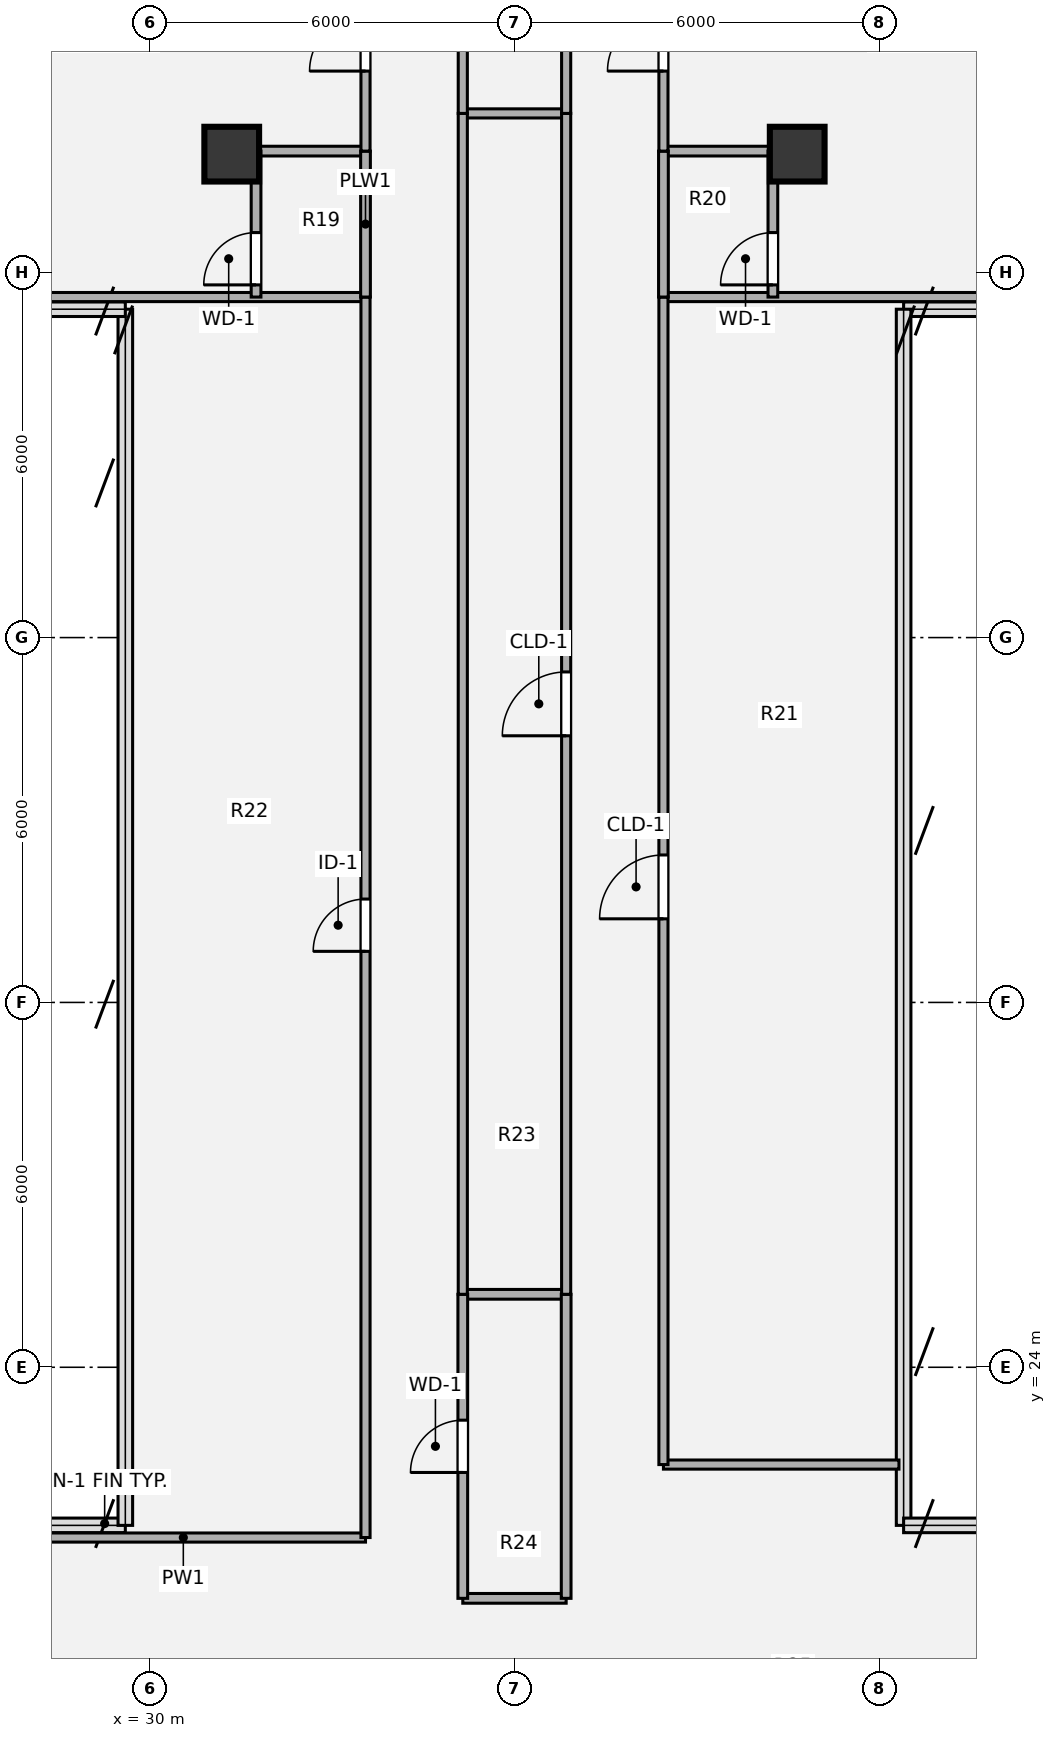
"""IFC4 building model, lengths in metres.
Left out: names, types, materials, properties, quantities, classifications, styles, units other than length and angle.
Written with IfcOpenShell. Run it as: python <this file> out.ifc"""

import sys

from ifc_helpers import new_model, si_unit, direction, frame, frame_2d, origin, origin_2d, place, context, subcontext, project, spatial, rectangle, hollow_circle, extrude, source, transform, mapped, element, fill, save


model = new_model("IFC4")
c1 = context("Model", 3, precision=1e-05, world=origin(), true_north=direction((0.0, 1.0)))
c2 = subcontext(c1, "Body", "Model", "MODEL_VIEW")
j1 = project(units=[si_unit("LENGTHUNIT", "METRE"), si_unit("PLANEANGLEUNIT", "RADIAN")], contexts=[c1])
p1 = place(None, origin())
s1 = spatial("IfcSite", under=j1, at=p1, CompositionType="ELEMENT")
p2 = place(p1, origin())
s2 = spatial("IfcBuilding", under=s1, at=p2, CompositionType="ELEMENT")
p3 = place(p2, frame((0.0, 0.0, 226.8)))
s3 = spatial("IfcBuildingStorey", under=s2, at=p3, CompositionType="ELEMENT", Elevation=226.8)
m1 = source(origin(), c2, "Body", "SweptSolid", [
    extrude(hollow_circle(Radius=0.45, WallThickness=0.032, at=origin_2d()), origin(), (0.0, 0.0, 1.0), 3.78),
])
for number, where, z_axis, x_axis in (
    (1, (31.35, 43.95, 0.0), (0.0, 0.0, 1.0), (1.0, 0.0, 0.0)),
    (2, (40.65, 43.95, 0.0), (0.0, 0.0, 1.0), (1.0, 0.0, 0.0)),
):
    element("IfcColumn", number, at=place(p3, frame(where, z_axis=z_axis, x_axis=x_axis)), inside=s3, PredefinedType="COLUMN", context=c2, shape_type="MappedRepresentation", body=[
        mapped(m1, transform((0.0, 0.0, 0.0), x_axis=(1.0, 0.0, 0.0), y_axis=(0.0, 1.0, 0.0), z_axis=(0.0, 0.0, 1.0), scale=1.0)),
    ])
p4 = place(p3, frame((35.15, 20.2, 0.0), z_axis=(0.0, 0.0, 1.0), x_axis=(1.0, 0.0, 0.0)))
e3 = element("IfcWall", 3, at=p4, inside=s3, PredefinedType="PLUMBINGWALL", context=c2, shape_type="SweptSolid", body=[
    extrude(rectangle(XDim=1.7, YDim=0.16, at=frame_2d((0.85, 0.0))), origin(), (0.0, 0.0, 1.0), 3.5),
])
p5 = place(p3, frame((27.558, 21.2, 0.0), z_axis=(0.0, 0.0, 1.0), x_axis=(1.0, 0.0, 0.0)))
e4 = element("IfcWall", 4, at=p5, inside=s3, PredefinedType="PARTITIONING", context=c2, shape_type="SweptSolid", body=[
    extrude(rectangle(XDim=5.992, YDim=0.15, at=frame_2d((2.996, 0.0))), origin(), (0.0, 0.0, 1.0), 3.5),
])
p6 = place(p3, frame((38.45, 22.4, 0.0), z_axis=(0.0, 0.0, 1.0), x_axis=(1.0, 0.0, 0.0)))
e5 = element("IfcWall", 5, at=p6, inside=s3, PredefinedType="PARTITIONING", context=c2, shape_type="SweptSolid", body=[
    extrude(rectangle(XDim=3.873, YDim=0.15, at=frame_2d((1.937, 0.0))), origin(), (0.0, 0.0, 1.0), 3.5),
])
p7 = place(p3, frame((35.15, 25.2, 0.0), z_axis=(0.0, 0.0, 1.0), x_axis=(1.0, 0.0, 0.0)))
e6 = element("IfcWall", 6, at=p7, inside=s3, PredefinedType="PLUMBINGWALL", context=c2, shape_type="SweptSolid", body=[
    extrude(rectangle(XDim=1.7, YDim=0.16, at=frame_2d((0.85, 0.0))), origin(), (0.0, 0.0, 1.0), 3.5),
])
p8 = place(p3, frame((27.558, 41.6, 0.0), z_axis=(0.0, 0.0, 1.0), x_axis=(1.0, 0.0, 0.0)))
e7 = element("IfcWall", 7, at=p8, inside=s3, PredefinedType="PARTITIONING", context=c2, shape_type="SweptSolid", body=[
    extrude(rectangle(XDim=5.992, YDim=0.15, at=frame_2d((2.996, 0.0))), origin(), (0.0, 0.0, 1.0), 3.5),
])
p9 = place(p3, frame((38.45, 41.6, 0.0), z_axis=(0.0, 0.0, 1.0), x_axis=(1.0, 0.0, 0.0)))
e8 = element("IfcWall", 8, at=p9, inside=s3, PredefinedType="PARTITIONING", context=c2, shape_type="SweptSolid", body=[
    extrude(rectangle(XDim=5.993, YDim=0.15, at=frame_2d((2.997, 0.0))), origin(), (0.0, 0.0, 1.0), 3.5),
])
for number, where, z_axis, x_axis in (
    (9, (31.75, 44.0, 0.0), (0.0, 0.0, 1.0), (1.0, 0.0, 0.0)),
    (10, (38.45, 44.0, 0.0), (0.0, 0.0, 1.0), (1.0, 0.0, 0.0)),
):
    element("IfcWall", number, at=place(p3, frame(where, z_axis=z_axis, x_axis=x_axis)), inside=s3, PredefinedType="PLUMBINGWALL", context=c2, shape_type="SweptSolid", body=[
        extrude(rectangle(XDim=1.8, YDim=0.16, at=frame_2d((0.9, 0.0))), origin(), (0.0, 0.0, 1.0), 2.903),
    ])
p10 = place(p3, frame((35.15, 44.62, 0.0), z_axis=(0.0, 0.0, 1.0), x_axis=(1.0, 0.0, 0.0)))
e11 = element("IfcWall", 11, at=p10, inside=s3, PredefinedType="PARTITIONING", context=c2, shape_type="SweptSolid", body=[
    extrude(rectangle(XDim=1.7, YDim=0.15, at=frame_2d((0.85, 0.0))), origin(), (0.0, 0.0, 1.0), 3.259),
])
p11 = place(p3, frame((31.75, 41.6, 0.0), z_axis=(0.0, 0.0, 1.0), x_axis=(0.0, 1.0, 0.0)))
e12 = element("IfcWall", 12, at=p11, inside=s3, PredefinedType="PLUMBINGWALL", context=c2, shape_type="SweptSolid", body=[
    extrude(rectangle(XDim=2.4, YDim=0.16, at=frame_2d((1.2, 0.0))), origin(), (0.0, 0.0, 1.0), 3.5),
])
p12 = place(p11, frame((0.2, 0.0, 0.0)))
e13 = element("IfcOpeningElement", 13, at=p12, cuts=e12, PredefinedType="OPENING", context=c2, shape_type="SweptSolid", body=[
    extrude(rectangle(XDim=0.86, YDim=2.1, at=origin_2d()), frame((0.43, 0.09, 1.05), z_axis=(0.0, -1.0, 0.0), x_axis=(1.0, 0.0, 0.0)), (0.0, 0.0, 1.0), 0.18),
])
p13 = place(p3, frame((33.55, 21.2, 0.0), z_axis=(0.0, 0.0, 1.0), x_axis=(0.0, 1.0, 0.0)))
e14 = element("IfcWall", 14, at=p13, inside=s3, PredefinedType="PARTITIONING", context=c2, shape_type="SweptSolid", body=[
    extrude(rectangle(XDim=20.4, YDim=0.15, at=frame_2d((10.2, 0.0))), origin(), (0.0, 0.0, 1.0), 3.5),
])
p14 = place(p13, frame((9.64, 0.0, 0.0)))
e15 = element("IfcOpeningElement", 15, at=p14, cuts=e14, PredefinedType="OPENING", context=c2, shape_type="SweptSolid", body=[
    extrude(rectangle(XDim=0.86, YDim=2.1, at=origin_2d()), frame((0.43, 0.085, 1.05), z_axis=(0.0, -1.0, 0.0), x_axis=(1.0, 0.0, 0.0)), (0.0, 0.0, 1.0), 0.17),
])
p15 = place(p3, frame((33.55, 41.6, 0.0), z_axis=(0.0, 0.0, 1.0), x_axis=(0.0, 1.0, 0.0)))
e16 = element("IfcWall", 16, at=p15, inside=s3, PredefinedType="PLUMBINGWALL", context=c2, shape_type="SweptSolid", body=[
    extrude(rectangle(XDim=2.4, YDim=0.16, at=frame_2d((1.2, 0.0))), origin(), (0.0, 0.0, 1.0), 3.5),
])
p16 = place(p3, frame((33.55, 44.0, 0.0), z_axis=(0.0, 0.0, 1.0), x_axis=(0.0, 1.0, 0.0)))
e17 = element("IfcWall", 17, at=p16, inside=s3, PredefinedType="PARTITIONING", context=c2, shape_type="SweptSolid", body=[
    extrude(rectangle(XDim=3.552, YDim=0.15, at=frame_2d((1.776, 0.0))), origin(), (0.0, 0.0, 1.0), 3.5),
])
p17 = place(p16, frame((1.316, 0.0, 0.0)))
e18 = element("IfcOpeningElement", 18, at=p17, cuts=e17, PredefinedType="OPENING", context=c2, shape_type="SweptSolid", body=[
    extrude(rectangle(XDim=0.92, YDim=2.1, at=origin_2d()), frame((0.46, 0.085, 1.05), z_axis=(0.0, -1.0, 0.0), x_axis=(1.0, 0.0, 0.0)), (0.0, 0.0, 1.0), 0.17),
])
p18 = place(p3, frame((35.15, 20.2, 0.0), z_axis=(0.0, 0.0, 1.0), x_axis=(0.0, 1.0, 0.0)))
e19 = element("IfcWall", 19, at=p18, inside=s3, PredefinedType="PLUMBINGWALL", context=c2, shape_type="SweptSolid", body=[
    extrude(rectangle(XDim=5.0, YDim=0.16, at=frame_2d((2.5, 0.0))), origin(), (0.0, 0.0, 1.0), 3.5),
])
p19 = place(p18, frame((2.07, 0.0, 0.0)))
e20 = element("IfcOpeningElement", 20, at=p19, cuts=e19, PredefinedType="OPENING", context=c2, shape_type="SweptSolid", body=[
    extrude(rectangle(XDim=0.86, YDim=2.1, at=origin_2d()), frame((0.43, 0.09, 1.05), z_axis=(0.0, -1.0, 0.0), x_axis=(1.0, 0.0, 0.0)), (0.0, 0.0, 1.0), 0.18),
])
p20 = place(p3, frame((35.15, 25.2, 0.0), z_axis=(0.0, 0.0, 1.0), x_axis=(0.0, 1.0, 0.0)))
e21 = element("IfcWall", 21, at=p20, inside=s3, PredefinedType="PARTITIONING", context=c2, shape_type="SweptSolid", body=[
    extrude(rectangle(XDim=19.42, YDim=0.15, at=frame_2d((9.71, 0.0))), origin(), (0.0, 0.0, 1.0), 3.5),
])
p21 = place(p3, frame((35.15, 44.62, 0.0), z_axis=(0.0, 0.0, 1.0), x_axis=(0.0, 1.0, 0.0)))
e22 = element("IfcWall", 22, at=p21, inside=s3, PredefinedType="PARTITIONING", context=c2, shape_type="SweptSolid", body=[
    extrude(rectangle(XDim=12.58, YDim=0.15, at=frame_2d((6.29, 0.0))), origin(), (0.0, 0.0, 1.0), 3.5),
])
p22 = place(p21, frame((5.83, 0.0, 0.0)))
e23 = element("IfcOpeningElement", 23, at=p22, cuts=e22, PredefinedType="OPENING", context=c2, shape_type="SweptSolid", body=[
    extrude(rectangle(XDim=0.86, YDim=2.1, at=origin_2d()), frame((0.43, 0.085, 1.05), z_axis=(0.0, -1.0, 0.0), x_axis=(1.0, 0.0, 0.0)), (0.0, 0.0, 1.0), 0.17),
])
p23 = place(p3, frame((36.85, 20.2, 0.0), z_axis=(0.0, 0.0, 1.0), x_axis=(0.0, 1.0, 0.0)))
e24 = element("IfcWall", 24, at=p23, inside=s3, PredefinedType="PLUMBINGWALL", context=c2, shape_type="SweptSolid", body=[
    extrude(rectangle(XDim=5.0, YDim=0.16, at=frame_2d((2.5, 0.0))), origin(), (0.0, 0.0, 1.0), 3.5),
])
p24 = place(p3, frame((36.85, 25.2, 0.0), z_axis=(0.0, 0.0, 1.0), x_axis=(0.0, 1.0, 0.0)))
e25 = element("IfcWall", 25, at=p24, inside=s3, PredefinedType="PARTITIONING", context=c2, shape_type="SweptSolid", body=[
    extrude(rectangle(XDim=19.42, YDim=0.15, at=frame_2d((9.71, 0.0))), origin(), (0.0, 0.0, 1.0), 3.5),
])
p25 = place(p24, frame((9.185, 0.0, 0.0)))
e26 = element("IfcOpeningElement", 26, at=p25, cuts=e25, PredefinedType="OPENING", context=c2, shape_type="SweptSolid", body=[
    extrude(rectangle(XDim=1.05, YDim=2.1, at=origin_2d()), frame((0.525, 0.085, 1.05), z_axis=(0.0, -1.0, 0.0), x_axis=(1.0, 0.0, 0.0)), (0.0, 0.0, 1.0), 0.17),
])
p26 = place(p3, frame((36.85, 44.62, 0.0), z_axis=(0.0, 0.0, 1.0), x_axis=(0.0, 1.0, 0.0)))
e27 = element("IfcWall", 27, at=p26, inside=s3, PredefinedType="PARTITIONING", context=c2, shape_type="SweptSolid", body=[
    extrude(rectangle(XDim=12.58, YDim=0.15, at=frame_2d((6.29, 0.0))), origin(), (0.0, 0.0, 1.0), 3.5),
])
p27 = place(p3, frame((38.45, 22.4, 0.0), z_axis=(0.0, 0.0, 1.0), x_axis=(0.0, 1.0, 0.0)))
e28 = element("IfcWall", 28, at=p27, inside=s3, PredefinedType="PARTITIONING", context=c2, shape_type="SweptSolid", body=[
    extrude(rectangle(XDim=19.2, YDim=0.15, at=frame_2d((9.6, 0.0))), origin(), (0.0, 0.0, 1.0), 3.5),
])
p28 = place(p27, frame((8.975, 0.0, 0.0)))
e29 = element("IfcOpeningElement", 29, at=p28, cuts=e28, PredefinedType="OPENING", context=c2, shape_type="SweptSolid", body=[
    extrude(rectangle(XDim=1.05, YDim=2.1, at=origin_2d()), frame((0.525, 0.085, 1.05), z_axis=(0.0, -1.0, 0.0), x_axis=(1.0, 0.0, 0.0)), (0.0, 0.0, 1.0), 0.17),
])
p29 = place(p3, frame((38.45, 41.6, 0.0), z_axis=(0.0, 0.0, 1.0), x_axis=(0.0, 1.0, 0.0)))
e30 = element("IfcWall", 30, at=p29, inside=s3, PredefinedType="PLUMBINGWALL", context=c2, shape_type="SweptSolid", body=[
    extrude(rectangle(XDim=2.4, YDim=0.16, at=frame_2d((1.2, 0.0))), origin(), (0.0, 0.0, 1.0), 3.5),
])
p30 = place(p3, frame((38.45, 44.0, 0.0), z_axis=(0.0, 0.0, 1.0), x_axis=(0.0, 1.0, 0.0)))
e31 = element("IfcWall", 31, at=p30, inside=s3, PredefinedType="PARTITIONING", context=c2, shape_type="SweptSolid", body=[
    extrude(rectangle(XDim=3.552, YDim=0.15, at=frame_2d((1.776, 0.0))), origin(), (0.0, 0.0, 1.0), 3.5),
])
p31 = place(p30, frame((1.316, 0.0, 0.0)))
e32 = element("IfcOpeningElement", 32, at=p31, cuts=e31, PredefinedType="OPENING", context=c2, shape_type="SweptSolid", body=[
    extrude(rectangle(XDim=0.92, YDim=2.1, at=origin_2d()), frame((0.46, 0.085, 1.05), z_axis=(0.0, -1.0, 0.0), x_axis=(1.0, 0.0, 0.0)), (0.0, 0.0, 1.0), 0.17),
])
p32 = place(p3, frame((40.25, 41.6, 0.0), z_axis=(0.0, 0.0, 1.0), x_axis=(0.0, 1.0, 0.0)))
e33 = element("IfcWall", 33, at=p32, inside=s3, PredefinedType="PLUMBINGWALL", context=c2, shape_type="SweptSolid", body=[
    extrude(rectangle(XDim=2.4, YDim=0.16, at=frame_2d((1.2, 0.0))), origin(), (0.0, 0.0, 1.0), 3.5),
])
p33 = place(p32, frame((0.2, 0.0, 0.0)))
e34 = element("IfcOpeningElement", 34, at=p33, cuts=e33, PredefinedType="OPENING", context=c2, shape_type="SweptSolid", body=[
    extrude(rectangle(XDim=0.86, YDim=2.1, at=origin_2d()), frame((0.43, 0.09, 1.05), z_axis=(0.0, -1.0, 0.0), x_axis=(1.0, 0.0, 0.0)), (0.0, 0.0, 1.0), 0.18),
])
m2 = source(origin(), c2, "Body", "SweptSolid", [
    extrude(rectangle(XDim=0.86, YDim=2.1, at=origin_2d()), frame((0.43, 0.025, 1.05), z_axis=(0.0, -1.0, 0.0), x_axis=(1.0, 0.0, 0.0)), (0.0, 0.0, 1.0), 0.05),
])
p34 = place(p12, origin())
e35 = element("IfcDoor", 35, at=p34, inside=s3, OperationType="SINGLE_SWING_LEFT", PredefinedType="DOOR", context=c2, shape_type="MappedRepresentation", body=[
    mapped(m2, transform((0.0, 0.0, 0.0), x_axis=(1.0, 0.0, 0.0), y_axis=(0.0, 1.0, 0.0), z_axis=(0.0, 0.0, 1.0), scale=1.0)),
])
fill(e13, e35)
m3 = source(origin(), c2, "Body", "SweptSolid", [
    extrude(rectangle(XDim=0.86, YDim=2.1, at=origin_2d()), frame((0.43, 0.025, 1.05), z_axis=(0.0, -1.0, 0.0), x_axis=(1.0, 0.0, 0.0)), (0.0, 0.0, 1.0), 0.05),
])
p35 = place(p14, origin())
e36 = element("IfcDoor", 36, at=p35, inside=s3, OperationType="SINGLE_SWING_LEFT", PredefinedType="DOOR", context=c2, shape_type="MappedRepresentation", body=[
    mapped(m3, transform((0.0, 0.0, 0.0), x_axis=(1.0, 0.0, 0.0), y_axis=(0.0, 1.0, 0.0), z_axis=(0.0, 0.0, 1.0), scale=1.0)),
])
fill(e15, e36)
m4 = source(origin(), c2, "Body", "SweptSolid", [
    extrude(rectangle(XDim=0.92, YDim=2.1, at=origin_2d()), frame((0.46, 0.025, 1.05), z_axis=(0.0, -1.0, 0.0), x_axis=(1.0, 0.0, 0.0)), (0.0, 0.0, 1.0), 0.05),
])
p36 = place(p17, origin())
e37 = element("IfcDoor", 37, at=p36, inside=s3, OperationType="SINGLE_SWING_LEFT", PredefinedType="DOOR", context=c2, shape_type="MappedRepresentation", body=[
    mapped(m4, transform((0.0, 0.0, 0.0), x_axis=(1.0, 0.0, 0.0), y_axis=(0.0, 1.0, 0.0), z_axis=(0.0, 0.0, 1.0), scale=1.0)),
])
fill(e18, e37)
p37 = place(p19, origin())
e38 = element("IfcDoor", 38, at=p37, inside=s3, OperationType="SINGLE_SWING_LEFT", PredefinedType="DOOR", context=c2, shape_type="MappedRepresentation", body=[
    mapped(m2, transform((0.0, 0.0, 0.0), x_axis=(1.0, 0.0, 0.0), y_axis=(0.0, 1.0, 0.0), z_axis=(0.0, 0.0, 1.0), scale=1.0)),
])
fill(e20, e38)
m5 = source(origin(), c2, "Body", "SweptSolid", [
    extrude(rectangle(XDim=1.05, YDim=2.1, at=origin_2d()), frame((0.525, 0.025, 1.05), z_axis=(0.0, -1.0, 0.0), x_axis=(1.0, 0.0, 0.0)), (0.0, 0.0, 1.0), 0.05),
])
p38 = place(p25, origin())
e39 = element("IfcDoor", 39, at=p38, inside=s3, OperationType="SINGLE_SWING_LEFT", PredefinedType="DOOR", context=c2, shape_type="MappedRepresentation", body=[
    mapped(m5, transform((0.0, 0.0, 0.0), x_axis=(1.0, 0.0, 0.0), y_axis=(0.0, 1.0, 0.0), z_axis=(0.0, 0.0, 1.0), scale=1.0)),
])
fill(e26, e39)
p39 = place(p28, origin())
e40 = element("IfcDoor", 40, at=p39, inside=s3, OperationType="SINGLE_SWING_LEFT", PredefinedType="DOOR", context=c2, shape_type="MappedRepresentation", body=[
    mapped(m5, transform((0.0, 0.0, 0.0), x_axis=(1.0, 0.0, 0.0), y_axis=(0.0, 1.0, 0.0), z_axis=(0.0, 0.0, 1.0), scale=1.0)),
])
fill(e29, e40)
p40 = place(p31, origin())
e41 = element("IfcDoor", 41, at=p40, inside=s3, OperationType="SINGLE_SWING_LEFT", PredefinedType="DOOR", context=c2, shape_type="MappedRepresentation", body=[
    mapped(m4, transform((0.0, 0.0, 0.0), x_axis=(1.0, 0.0, 0.0), y_axis=(0.0, 1.0, 0.0), z_axis=(0.0, 0.0, 1.0), scale=1.0)),
])
fill(e32, e41)
p41 = place(p33, origin())
e42 = element("IfcDoor", 42, at=p41, inside=s3, OperationType="SINGLE_SWING_LEFT", PredefinedType="DOOR", context=c2, shape_type="MappedRepresentation", body=[
    mapped(m2, transform((0.0, 0.0, 0.0), x_axis=(1.0, 0.0, 0.0), y_axis=(0.0, 1.0, 0.0), z_axis=(0.0, 0.0, 1.0), scale=1.0)),
])
fill(e34, e42)
save(model, sys.argv[1])
